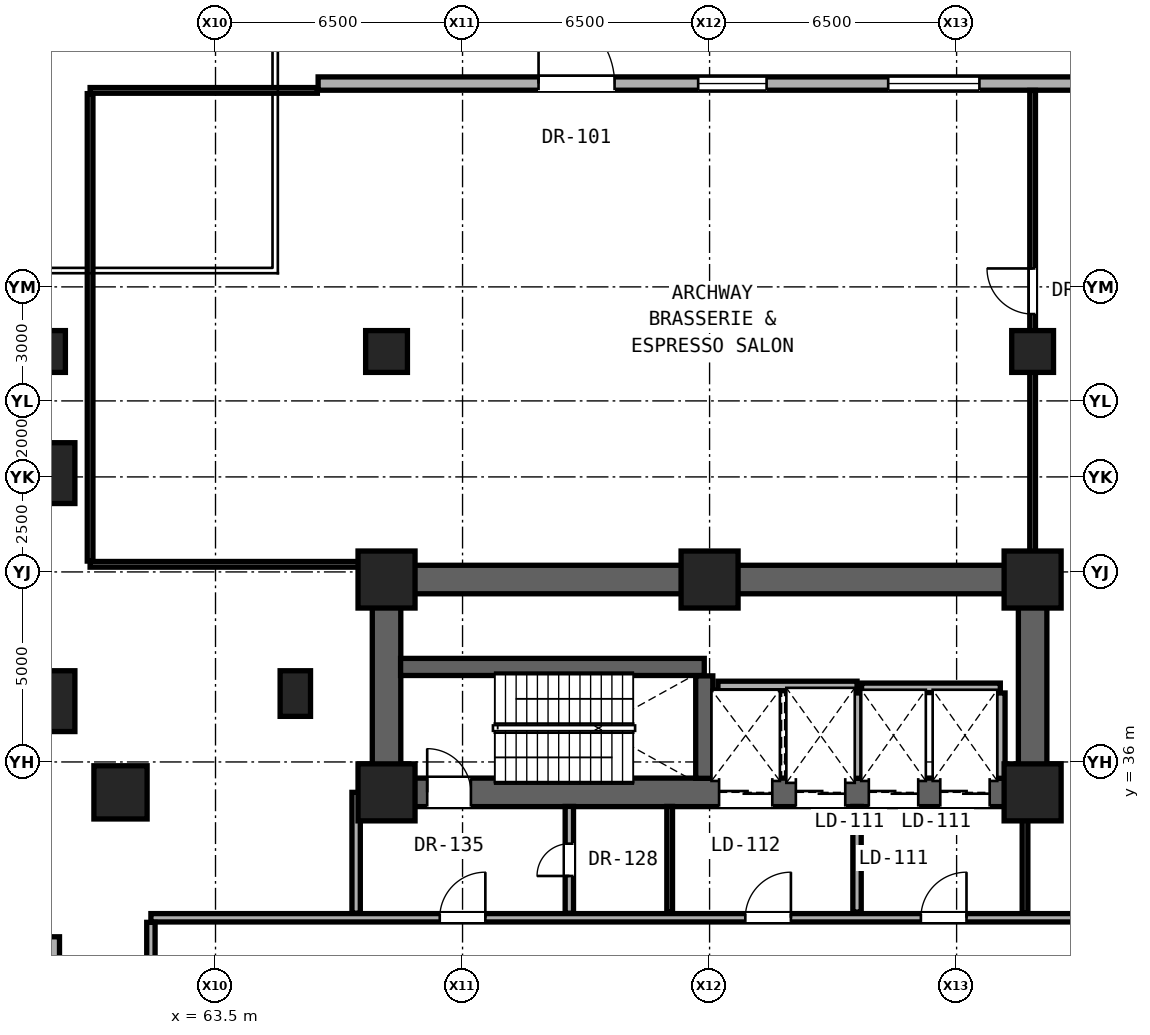
"""IFC4 building model, lengths in metres.
Left out: names, types, materials, properties, quantities, classifications, styles, units other than length and angle.
Written with IfcOpenShell. Run it as: python <this file> out.ifc"""

import sys

from ifc_helpers import new_model, si_unit, direction, frame, frame_2d, origin, origin_2d, place, context, subcontext, project, spatial, rectangle, hollow_rectangle, extrude, element, fill, save


model = new_model("IFC4")
c1 = context("Model", 3, precision=1e-05, world=origin(), true_north=direction((0.0, 1.0)))
c2 = subcontext(c1, "Body", "Model", "MODEL_VIEW")
j1 = project(units=[si_unit("LENGTHUNIT", "METRE"), si_unit("PLANEANGLEUNIT", "RADIAN")], contexts=[c1])
p1 = place(None, origin())
s1 = spatial("IfcSite", under=j1, at=p1, CompositionType="ELEMENT")
p2 = place(p1, origin())
s2 = spatial("IfcBuilding", under=s1, at=p2, CompositionType="ELEMENT")
p3 = place(p2, origin())
s3 = spatial("IfcBuildingStorey", under=s2, at=p3, CompositionType="ELEMENT", Elevation=0.0)
for number, where, z_axis, x_axis in (
    (1, (68.0, 35.2, 0.0), (0.0, 0.0, 1.0), (1.0, 0.0, 0.0)),
    (2, (85.0, 35.2, 0.0), (0.0, 0.0, 1.0), (1.0, 0.0, 0.0)),
    (3, (68.0, 40.8, 0.0), (0.0, 0.0, 1.0), (1.0, 0.0, 0.0)),
    (4, (76.5, 40.8, 0.0), (0.0, 0.0, 1.0), (1.0, 0.0, 0.0)),
    (5, (85.0, 40.8, 0.0), (0.0, 0.0, 1.0), (1.0, 0.0, 0.0)),
):
    element("IfcColumn", number, at=place(p3, frame(where, z_axis=z_axis, x_axis=x_axis)), inside=s3, PredefinedType="COLUMN", context=c2, shape_type="SweptSolid", body=[
        extrude(rectangle(XDim=1.5, YDim=1.5, at=origin_2d()), origin(), (0.0, 0.0, 1.0), 5.2),
    ])
p4 = place(p3, frame((61.0, 35.2, 0.0), z_axis=(0.0, 0.0, 1.0), x_axis=(1.0, 0.0, 0.0)))
e6 = element("IfcColumn", 6, at=p4, inside=s3, PredefinedType="COLUMN", context=c2, shape_type="SweptSolid", body=[
    extrude(hollow_rectangle(XDim=1.4, YDim=1.4, WallThickness=0.08, at=origin_2d()), origin(), (0.0, 0.0, 1.0), 5.2),
])
p5 = place(p3, frame((65.6, 37.8, 0.0), z_axis=(0.0, 0.0, 1.0), x_axis=(1.0, 0.0, 0.0)))
e7 = element("IfcColumn", 7, at=p5, inside=s3, PredefinedType="PILASTER", context=c2, shape_type="SweptSolid", body=[
    extrude(rectangle(XDim=0.8, YDim=1.2, at=origin_2d()), origin(), (0.0, 0.0, 1.0), 5.2),
])
p6 = place(p3, frame((68.0, 40.8, 0.0), z_axis=(0.0, 0.0, 1.0), x_axis=(1.0, 0.0, 0.0)))
e8 = element("IfcWall", 8, at=p6, inside=s3, PredefinedType="SHEAR", context=c2, shape_type="SweptSolid", body=[
    extrude(rectangle(XDim=17.0, YDim=0.75, at=frame_2d((8.5, 0.0))), origin(), (0.0, 0.0, 1.0), 4.88),
])
for number, where, z_axis, x_axis in (
    (9, (68.0, 35.2, 0.0), (0.0, 0.0, 1.0), (0.0, 1.0, 0.0)),
    (10, (85.0, 35.2, 0.0), (0.0, 0.0, 1.0), (0.0, 1.0, 0.0)),
):
    element("IfcWall", number, at=place(p3, frame(where, z_axis=z_axis, x_axis=x_axis)), inside=s3, PredefinedType="SHEAR", context=c2, shape_type="SweptSolid", body=[
        extrude(rectangle(XDim=5.6, YDim=0.75, at=frame_2d((2.8, 0.0))), origin(), (0.0, 0.0, 1.0), 4.88),
    ])
p7 = place(p3, frame((68.0, 35.2, 0.0), z_axis=(0.0, 0.0, 1.0), x_axis=(1.0, 0.0, 0.0)))
e11 = element("IfcWall", 11, at=p7, inside=s3, PredefinedType="SHEAR", context=c2, shape_type="SweptSolid", body=[
    extrude(rectangle(XDim=17.0, YDim=0.75, at=frame_2d((8.5, 0.0))), origin(), (0.0, 0.0, 1.0), 4.88),
])
p8 = place(p7, frame((1.07, 0.0, 0.0)))
e12 = element("IfcOpeningElement", 12, at=p8, cuts=e11, PredefinedType="OPENING", context=c2, shape_type="SweptSolid", body=[
    extrude(rectangle(XDim=1.15, YDim=2.2, at=frame_2d((0.575, 1.1))), frame((0.0, 0.385, 0.0), z_axis=(0.0, -1.0, 0.0), x_axis=(1.0, 0.0, 0.0)), (0.0, 0.0, 1.0), 0.77),
])
p9 = place(p7, frame((8.75, 0.0, 0.0)))
e13 = element("IfcOpeningElement", 13, at=p9, cuts=e11, PredefinedType="OPENING", context=c2, shape_type="SweptSolid", body=[
    extrude(rectangle(XDim=1.4, YDim=2.35, at=frame_2d((0.7, 1.175))), frame((0.0, 0.385, 0.0), z_axis=(0.0, -1.0, 0.0), x_axis=(1.0, 0.0, 0.0)), (0.0, 0.0, 1.0), 0.77),
])
p10 = place(p7, frame((10.77, 0.0, 0.0)))
e14 = element("IfcOpeningElement", 14, at=p10, cuts=e11, PredefinedType="OPENING", context=c2, shape_type="SweptSolid", body=[
    extrude(rectangle(XDim=1.3, YDim=2.3, at=frame_2d((0.65, 1.15))), frame((0.0, 0.385, 0.0), z_axis=(0.0, -1.0, 0.0), x_axis=(1.0, 0.0, 0.0)), (0.0, 0.0, 1.0), 0.77),
])
p11 = place(p7, frame((12.69, 0.0, 0.0)))
e15 = element("IfcOpeningElement", 15, at=p11, cuts=e11, PredefinedType="OPENING", context=c2, shape_type="SweptSolid", body=[
    extrude(rectangle(XDim=1.3, YDim=2.3, at=frame_2d((0.65, 1.15))), frame((0.0, 0.385, 0.0), z_axis=(0.0, -1.0, 0.0), x_axis=(1.0, 0.0, 0.0)), (0.0, 0.0, 1.0), 0.77),
])
p12 = place(p7, frame((14.57, 0.0, 0.0)))
e16 = element("IfcOpeningElement", 16, at=p12, cuts=e11, PredefinedType="OPENING", context=c2, shape_type="SweptSolid", body=[
    extrude(rectangle(XDim=1.3, YDim=2.3, at=frame_2d((0.65, 1.15))), frame((0.0, 0.385, 0.0), z_axis=(0.0, -1.0, 0.0), x_axis=(1.0, 0.0, 0.0)), (0.0, 0.0, 1.0), 0.77),
])
for number, where, z_axis, x_axis in (
    (17, (59.0, 37.6, 0.0), (0.0, 0.0, 1.0), (1.0, 0.0, 0.0)),
    (18, (59.0, 43.6, 0.0), (0.0, 0.0, 1.0), (1.0, 0.0, 0.0)),
):
    element("IfcColumn", number, at=place(p3, frame(where, z_axis=z_axis, x_axis=x_axis)), inside=s3, PredefinedType="COLUMN", context=c2, shape_type="SweptSolid", body=[
        extrude(rectangle(XDim=1.6, YDim=1.6, at=origin_2d()), origin(), (0.0, 0.0, 1.0), 5.2),
    ])
for number, where, z_axis, x_axis in (
    (19, (59.0, 46.8, 0.0), (0.0, 0.0, 1.0), (1.0, 0.0, 0.0)),
    (20, (68.0, 46.8, 0.0), (0.0, 0.0, 1.0), (1.0, 0.0, 0.0)),
    (21, (85.0, 46.8, 0.0), (0.0, 0.0, 1.0), (1.0, 0.0, 0.0)),
):
    element("IfcColumn", number, at=place(p3, frame(where, z_axis=z_axis, x_axis=x_axis)), inside=s3, PredefinedType="COLUMN", context=c2, shape_type="SweptSolid", body=[
        extrude(rectangle(XDim=1.1, YDim=1.1, at=origin_2d()), origin(), (0.0, 0.0, 1.0), 5.2),
    ])
p13 = place(p3, frame((66.2, 53.85, 0.0), z_axis=(0.0, 0.0, 1.0), x_axis=(1.0, 0.0, 0.0)))
e22 = element("IfcWall", 22, at=p13, inside=s3, PredefinedType="SOLIDWALL", context=c2, shape_type="SweptSolid", body=[
    extrude(rectangle(XDim=27.6, YDim=0.35, at=frame_2d((13.8, 0.0))), origin(), (0.0, 0.0, 1.0), 4.86),
])
p14 = place(p13, frame((10.0, 0.0, 0.85)))
e23 = element("IfcOpeningElement", 23, at=p14, cuts=e22, PredefinedType="OPENING", context=c2, shape_type="SweptSolid", body=[
    extrude(rectangle(XDim=1.8, YDim=2.4, at=frame_2d((0.9, 1.2))), frame((0.0, 0.185, 0.0), z_axis=(0.0, -1.0, 0.0), x_axis=(1.0, 0.0, 0.0)), (0.0, 0.0, 1.0), 0.37),
])
p15 = place(p13, frame((15.0, 0.0, 0.85)))
e24 = element("IfcOpeningElement", 24, at=p15, cuts=e22, PredefinedType="OPENING", context=c2, shape_type="SweptSolid", body=[
    extrude(rectangle(XDim=2.4, YDim=2.6, at=frame_2d((1.2, 1.3))), frame((0.0, 0.185, 0.0), z_axis=(0.0, -1.0, 0.0), x_axis=(1.0, 0.0, 0.0)), (0.0, 0.0, 1.0), 0.37),
])
p16 = place(p13, frame((5.8, 0.0, 0.0)))
e25 = element("IfcOpeningElement", 25, at=p16, cuts=e22, PredefinedType="OPENING", context=c2, shape_type="SweptSolid", body=[
    extrude(rectangle(XDim=2.0, YDim=2.4, at=frame_2d((1.0, 1.2))), frame((0.0, 0.185, 0.0), z_axis=(0.0, -1.0, 0.0), x_axis=(1.0, 0.0, 0.0)), (0.0, 0.0, 1.0), 0.37),
])
p17 = place(p13, frame((24.9, 0.0, 0.0)))
e26 = element("IfcOpeningElement", 26, at=p17, cuts=e22, PredefinedType="OPENING", context=c2, shape_type="SweptSolid", body=[
    extrude(rectangle(XDim=2.0, YDim=2.4, at=frame_2d((1.0, 1.2))), frame((0.0, 0.185, 0.0), z_axis=(0.0, -1.0, 0.0), x_axis=(1.0, 0.0, 0.0)), (0.0, 0.0, 1.0), 0.37),
])
p18 = place(p3, frame((59.22, 20.6, 0.0), z_axis=(0.0, 0.0, 1.0), x_axis=(0.0, 1.0, 0.0)))
e27 = element("IfcWall", 27, at=p18, inside=s3, PredefinedType="SOLIDWALL", context=c2, shape_type="SweptSolid", body=[
    extrude(rectangle(XDim=10.8, YDim=0.35, at=frame_2d((5.4, 0.0))), origin(), (0.0, 0.0, 1.0), 3.832),
])
p19 = place(p18, frame((2.2, 0.0, 0.0)))
e28 = element("IfcOpeningElement", 28, at=p19, cuts=e27, PredefinedType="OPENING", context=c2, shape_type="SweptSolid", body=[
    extrude(rectangle(XDim=2.4, YDim=2.7, at=frame_2d((1.2, 1.35))), frame((0.0, 0.185, 0.0), z_axis=(0.0, -1.0, 0.0), x_axis=(1.0, 0.0, 0.0)), (0.0, 0.0, 1.0), 0.37),
])
p20 = place(p3, frame((61.8, 31.9, 0.0), z_axis=(0.0, 0.0, 1.0), x_axis=(1.0, 0.0, 0.0)))
e29 = element("IfcWall", 29, at=p20, inside=s3, PredefinedType="SOLIDWALL", context=c2, shape_type="SweptSolid", body=[
    extrude(rectangle(XDim=29.15, YDim=0.22, at=frame_2d((14.575, 0.0))), origin(), (0.0, 0.0, 1.0), 3.945),
])
p21 = place(p20, frame((7.6, 0.0, 0.0)))
e30 = element("IfcOpeningElement", 30, at=p21, cuts=e29, PredefinedType="OPENING", context=c2, shape_type="SweptSolid", body=[
    extrude(rectangle(XDim=1.2, YDim=2.25, at=frame_2d((0.6, 1.125))), frame((0.0, 0.12, 0.0), z_axis=(0.0, -1.0, 0.0), x_axis=(1.0, 0.0, 0.0)), (0.0, 0.0, 1.0), 0.24),
])
p22 = place(p20, frame((20.26, 0.0, 0.0)))
e31 = element("IfcOpeningElement", 31, at=p22, cuts=e29, PredefinedType="OPENING", context=c2, shape_type="SweptSolid", body=[
    extrude(rectangle(XDim=1.2, YDim=2.25, at=frame_2d((0.6, 1.125))), frame((0.0, 0.12, 0.0), z_axis=(0.0, -1.0, 0.0), x_axis=(1.0, 0.0, 0.0)), (0.0, 0.0, 1.0), 0.24),
])
p23 = place(p20, frame((15.64, 0.0, 0.0)))
e32 = element("IfcOpeningElement", 32, at=p23, cuts=e29, PredefinedType="OPENING", context=c2, shape_type="SweptSolid", body=[
    extrude(rectangle(XDim=1.2, YDim=2.25, at=frame_2d((0.6, 1.125))), frame((0.0, 0.12, 0.0), z_axis=(0.0, -1.0, 0.0), x_axis=(1.0, 0.0, 0.0)), (0.0, 0.0, 1.0), 0.24),
])
p24 = place(p3, frame((80.5, 37.95, 0.0), z_axis=(0.0, 0.0, 1.0), x_axis=(1.0, 0.0, 0.0)))
e33 = element("IfcWall", 33, at=p24, inside=s3, PredefinedType="SOLIDWALL", context=c2, shape_type="SweptSolid", body=[
    extrude(rectangle(XDim=3.65, YDim=0.25, at=frame_2d((1.825, 0.0))), origin(), (0.0, 0.0, 1.0), 4.88),
])
p25 = place(p3, frame((76.72, 38.0, 0.0), z_axis=(0.0, 0.0, 1.0), x_axis=(1.0, 0.0, 0.0)))
e34 = element("IfcWall", 34, at=p25, inside=s3, PredefinedType="SOLIDWALL", context=c2, shape_type="SweptSolid", body=[
    extrude(rectangle(XDim=3.66, YDim=0.25, at=frame_2d((1.83, 0.0))), origin(), (0.0, 0.0, 1.0), 4.88),
])
p26 = place(p3, frame((68.37, 38.5, 0.0), z_axis=(0.0, 0.0, 1.0), x_axis=(1.0, 0.0, 0.0)))
e35 = element("IfcWall", 35, at=p26, inside=s3, PredefinedType="SHEAR", context=c2, shape_type="SweptSolid", body=[
    extrude(rectangle(XDim=7.99, YDim=0.45, at=frame_2d((3.995, 0.0))), origin(), (0.0, 0.0, 1.0), 4.88),
])
p27 = place(p3, frame((60.2, 41.2, 0.0), z_axis=(0.0, 0.0, 1.0), x_axis=(1.0, 0.0, 0.0)))
e36 = element("IfcWall", 36, at=p27, inside=s3, PredefinedType="PARTITIONING", context=c2, shape_type="SweptSolid", body=[
    extrude(rectangle(XDim=7.78, YDim=0.15, at=frame_2d((3.89, 0.0))), origin(), (0.0, 0.0, 1.0), 3.924),
])
p28 = place(p3, frame((60.2, 53.67, 0.0), z_axis=(0.0, 0.0, 1.0), x_axis=(1.0, 0.0, 0.0)))
e37 = element("IfcWall", 37, at=p28, inside=s3, PredefinedType="PARTITIONING", context=c2, shape_type="SweptSolid", body=[
    extrude(rectangle(XDim=5.98, YDim=0.15, at=frame_2d((2.99, 0.0))), origin(), (0.0, 0.0, 1.0), 4.88),
])
p29 = place(p3, frame((60.2, 41.285, 0.0), z_axis=(0.0, 0.0, 1.0), x_axis=(0.0, 1.0, 0.0)))
e38 = element("IfcWall", 38, at=p29, inside=s3, PredefinedType="PARTITIONING", context=c2, shape_type="SweptSolid", body=[
    extrude(rectangle(XDim=12.3, YDim=0.15, at=frame_2d((6.15, 0.0))), origin(), (0.0, 0.0, 1.0), 3.924),
])
p30 = place(p3, frame((61.8, 29.52, 0.0), z_axis=(0.0, 0.0, 1.0), x_axis=(0.0, 1.0, 0.0)))
e39 = element("IfcWall", 39, at=p30, inside=s3, PredefinedType="SOLIDWALL", context=c2, shape_type="SweptSolid", body=[
    extrude(rectangle(XDim=2.26, YDim=0.22, at=frame_2d((1.13, 0.0))), origin(), (0.0, 0.0, 1.0), 4.88),
])
p31 = place(p3, frame((67.2, 32.02, 0.0), z_axis=(0.0, 0.0, 1.0), x_axis=(0.0, 1.0, 0.0)))
e40 = element("IfcWall", 40, at=p31, inside=s3, PredefinedType="SOLIDWALL", context=c2, shape_type="SweptSolid", body=[
    extrude(rectangle(XDim=3.18, YDim=0.22, at=frame_2d((1.59, 0.0))), origin(), (0.0, 0.0, 1.0), 3.772),
])
p32 = place(p3, frame((72.81, 32.02, 0.0), z_axis=(0.0, 0.0, 1.0), x_axis=(0.0, 1.0, 0.0)))
e41 = element("IfcWall", 41, at=p32, inside=s3, PredefinedType="SOLIDWALL", context=c2, shape_type="SweptSolid", body=[
    extrude(rectangle(XDim=2.81, YDim=0.22, at=frame_2d((1.405, 0.0))), origin(), (0.0, 0.0, 1.0), 4.88),
])
p33 = place(p32, frame((0.98, 0.0, 0.0)))
e42 = element("IfcOpeningElement", 42, at=p33, cuts=e41, PredefinedType="OPENING", context=c2, shape_type="SweptSolid", body=[
    extrude(rectangle(XDim=0.85, YDim=2.01, at=frame_2d((0.425, 1.005))), frame((0.0, 0.12, 0.0), z_axis=(0.0, -1.0, 0.0), x_axis=(1.0, 0.0, 0.0)), (0.0, 0.0, 1.0), 0.24),
])
p34 = place(p3, frame((75.45, 32.05, 0.0), z_axis=(0.0, 0.0, 1.0), x_axis=(0.0, 1.0, 0.0)))
e43 = element("IfcWall", 43, at=p34, inside=s3, PredefinedType="PARTITIONING", context=c2, shape_type="SweptSolid", body=[
    extrude(rectangle(XDim=2.78, YDim=0.15, at=frame_2d((1.39, 0.0))), origin(), (0.0, 0.0, 1.0), 4.88),
])
p35 = place(p3, frame((76.36, 35.57, 0.0), z_axis=(0.0, 0.0, 1.0), x_axis=(0.0, 1.0, 0.0)))
e44 = element("IfcWall", 44, at=p35, inside=s3, PredefinedType="SHEAR", context=c2, shape_type="SweptSolid", body=[
    extrude(rectangle(XDim=2.695, YDim=0.45, at=frame_2d((1.347, 0.0))), origin(), (0.0, 0.0, 1.0), 4.88),
])
p36 = place(p3, frame((80.38, 32.05, 0.0), z_axis=(0.0, 0.0, 1.0), x_axis=(0.0, 1.0, 0.0)))
e45 = element("IfcWall", 45, at=p36, inside=s3, PredefinedType="SOLIDWALL", context=c2, shape_type="SweptSolid", body=[
    extrude(rectangle(XDim=2.78, YDim=0.22, at=frame_2d((1.39, 0.0))), origin(), (0.0, 0.0, 1.0), 4.88),
])
for number, where, z_axis, x_axis in (
    (46, (80.38, 35.57, 0.0), (0.0, 0.0, 1.0), (0.0, 1.0, 0.0)),
    (47, (84.15, 35.57, 0.0), (0.0, 0.0, 1.0), (0.0, 1.0, 0.0)),
):
    element("IfcWall", number, at=place(p3, frame(where, z_axis=z_axis, x_axis=x_axis)), inside=s3, PredefinedType="SOLIDWALL", context=c2, shape_type="SweptSolid", body=[
        extrude(rectangle(XDim=2.245, YDim=0.25, at=frame_2d((1.123, 0.0))), origin(), (0.0, 0.0, 1.0), 4.88),
    ])
p37 = place(p3, frame((84.8, 32.02, 0.0), z_axis=(0.0, 0.0, 1.0), x_axis=(0.0, 1.0, 0.0)))
e48 = element("IfcWall", 48, at=p37, inside=s3, PredefinedType="PARTITIONING", context=c2, shape_type="SweptSolid", body=[
    extrude(rectangle(XDim=2.81, YDim=0.15, at=frame_2d((1.405, 0.0))), origin(), (0.0, 0.0, 1.0), 3.945),
])
p38 = place(p3, frame((85.0, 41.2, 0.0), z_axis=(0.0, 0.0, 1.0), x_axis=(0.0, 1.0, 0.0)))
e49 = element("IfcWall", 49, at=p38, inside=s3, PredefinedType="PARTITIONING", context=c2, shape_type="SweptSolid", body=[
    extrude(rectangle(XDim=12.47, YDim=0.15, at=frame_2d((6.235, 0.0))), origin(), (0.0, 0.0, 1.0), 4.016),
])
p39 = place(p38, frame((6.585, 0.0, 0.0)))
e50 = element("IfcOpeningElement", 50, at=p39, cuts=e49, PredefinedType="OPENING", context=c2, shape_type="SweptSolid", body=[
    extrude(rectangle(XDim=1.2, YDim=2.25, at=frame_2d((0.6, 1.125))), frame((0.0, 0.085, 0.0), z_axis=(0.0, -1.0, 0.0), x_axis=(1.0, 0.0, 0.0)), (0.0, 0.0, 1.0), 0.17),
])
p40 = place(p14, origin())
e51 = element("IfcWindow", 51, at=p40, inside=s3, PartitioningType="SINGLE_PANEL", PredefinedType="WINDOW", context=c2, shape_type="SweptSolid", body=[
    extrude(rectangle(XDim=1.8, YDim=2.4, at=frame_2d((0.9, 1.2))), frame((0.0, 0.03, 0.0), z_axis=(0.0, -1.0, 0.0), x_axis=(1.0, 0.0, 0.0)), (0.0, 0.0, 1.0), 0.06),
])
fill(e23, e51)
p41 = place(p15, origin())
e52 = element("IfcWindow", 52, at=p41, inside=s3, PartitioningType="SINGLE_PANEL", PredefinedType="WINDOW", context=c2, shape_type="SweptSolid", body=[
    extrude(rectangle(XDim=2.4, YDim=2.6, at=frame_2d((1.2, 1.3))), frame((0.0, 0.03, 0.0), z_axis=(0.0, -1.0, 0.0), x_axis=(1.0, 0.0, 0.0)), (0.0, 0.0, 1.0), 0.06),
])
fill(e24, e52)
p42 = place(p16, origin())
e53 = element("IfcDoor", 53, at=p42, inside=s3, OperationType="SINGLE_SWING_LEFT", PredefinedType="DOOR", context=c2, shape_type="SweptSolid", body=[
    extrude(rectangle(XDim=2.0, YDim=2.4, at=frame_2d((1.0, 1.2))), frame((0.0, 0.025, 0.0), z_axis=(0.0, -1.0, 0.0), x_axis=(1.0, 0.0, 0.0)), (0.0, 0.0, 1.0), 0.05),
])
fill(e25, e53)
p43 = place(p21, origin())
e54 = element("IfcDoor", 54, at=p43, inside=s3, OperationType="SINGLE_SWING_RIGHT", PredefinedType="DOOR", context=c2, shape_type="SweptSolid", body=[
    extrude(rectangle(XDim=1.2, YDim=2.25, at=frame_2d((0.6, 1.125))), frame((0.0, 0.025, 0.0), z_axis=(0.0, -1.0, 0.0), x_axis=(1.0, 0.0, 0.0)), (0.0, 0.0, 1.0), 0.05),
])
fill(e30, e54)
p44 = place(p22, origin())
e55 = element("IfcDoor", 55, at=p44, inside=s3, OperationType="SINGLE_SWING_RIGHT", PredefinedType="DOOR", context=c2, shape_type="SweptSolid", body=[
    extrude(rectangle(XDim=1.2, YDim=2.25, at=frame_2d((0.6, 1.125))), frame((0.0, 0.025, 0.0), z_axis=(0.0, -1.0, 0.0), x_axis=(1.0, 0.0, 0.0)), (0.0, 0.0, 1.0), 0.05),
])
fill(e31, e55)
p45 = place(p8, origin())
e56 = element("IfcDoor", 56, at=p45, inside=s3, OperationType="SINGLE_SWING_LEFT", PredefinedType="DOOR", context=c2, shape_type="SweptSolid", body=[
    extrude(rectangle(XDim=1.15, YDim=2.2, at=frame_2d((0.575, 1.1))), frame((0.0, 0.025, 0.0), z_axis=(0.0, -1.0, 0.0), x_axis=(1.0, 0.0, 0.0)), (0.0, 0.0, 1.0), 0.05),
])
fill(e12, e56)
p46 = place(p23, origin())
e57 = element("IfcDoor", 57, at=p46, inside=s3, OperationType="SINGLE_SWING_RIGHT", PredefinedType="DOOR", context=c2, shape_type="SweptSolid", body=[
    extrude(rectangle(XDim=1.2, YDim=2.25, at=frame_2d((0.6, 1.125))), frame((0.0, 0.025, 0.0), z_axis=(0.0, -1.0, 0.0), x_axis=(1.0, 0.0, 0.0)), (0.0, 0.0, 1.0), 0.05),
])
fill(e32, e57)
p47 = place(p33, origin())
e58 = element("IfcDoor", 58, at=p47, inside=s3, OperationType="SINGLE_SWING_LEFT", PredefinedType="DOOR", context=c2, shape_type="SweptSolid", body=[
    extrude(rectangle(XDim=0.85, YDim=2.01, at=frame_2d((0.425, 1.005))), frame((0.0, 0.025, 0.0), z_axis=(0.0, -1.0, 0.0), x_axis=(1.0, 0.0, 0.0)), (0.0, 0.0, 1.0), 0.05),
])
fill(e42, e58)
p48 = place(p39, origin())
e59 = element("IfcDoor", 59, at=p48, inside=s3, OperationType="SINGLE_SWING_RIGHT", PredefinedType="DOOR", context=c2, shape_type="SweptSolid", body=[
    extrude(rectangle(XDim=1.2, YDim=2.25, at=frame_2d((0.6, 1.125))), frame((0.0, 0.025, 0.0), z_axis=(0.0, -1.0, 0.0), x_axis=(1.0, 0.0, 0.0)), (0.0, 0.0, 1.0), 0.05),
])
fill(e50, e59)
p49 = place(p9, origin())
e60 = element("IfcDoor", 60, at=p49, inside=s3, OperationType="DOUBLE_DOOR_SLIDING", PredefinedType="DOOR", context=c2, shape_type="SweptSolid", body=[
    extrude(rectangle(XDim=1.4, YDim=2.35, at=frame_2d((0.7, 1.175))), frame((0.0, 0.025, 0.0), z_axis=(0.0, -1.0, 0.0), x_axis=(1.0, 0.0, 0.0)), (0.0, 0.0, 1.0), 0.05),
])
fill(e13, e60)
p50 = place(p10, origin())
e61 = element("IfcDoor", 61, at=p50, inside=s3, OperationType="DOUBLE_DOOR_SLIDING", PredefinedType="DOOR", context=c2, shape_type="SweptSolid", body=[
    extrude(rectangle(XDim=1.3, YDim=2.3, at=frame_2d((0.65, 1.15))), frame((0.0, 0.025, 0.0), z_axis=(0.0, -1.0, 0.0), x_axis=(1.0, 0.0, 0.0)), (0.0, 0.0, 1.0), 0.05),
])
fill(e14, e61)
p51 = place(p11, origin())
e62 = element("IfcDoor", 62, at=p51, inside=s3, OperationType="DOUBLE_DOOR_SLIDING", PredefinedType="DOOR", context=c2, shape_type="SweptSolid", body=[
    extrude(rectangle(XDim=1.3, YDim=2.3, at=frame_2d((0.65, 1.15))), frame((0.0, 0.025, 0.0), z_axis=(0.0, -1.0, 0.0), x_axis=(1.0, 0.0, 0.0)), (0.0, 0.0, 1.0), 0.05),
])
fill(e15, e62)
p52 = place(p12, origin())
e63 = element("IfcDoor", 63, at=p52, inside=s3, OperationType="DOUBLE_DOOR_SLIDING", PredefinedType="DOOR", context=c2, shape_type="SweptSolid", body=[
    extrude(rectangle(XDim=1.3, YDim=2.3, at=frame_2d((0.65, 1.15))), frame((0.0, 0.025, 0.0), z_axis=(0.0, -1.0, 0.0), x_axis=(1.0, 0.0, 0.0)), (0.0, 0.0, 1.0), 0.05),
])
fill(e16, e63)
save(model, sys.argv[1])
